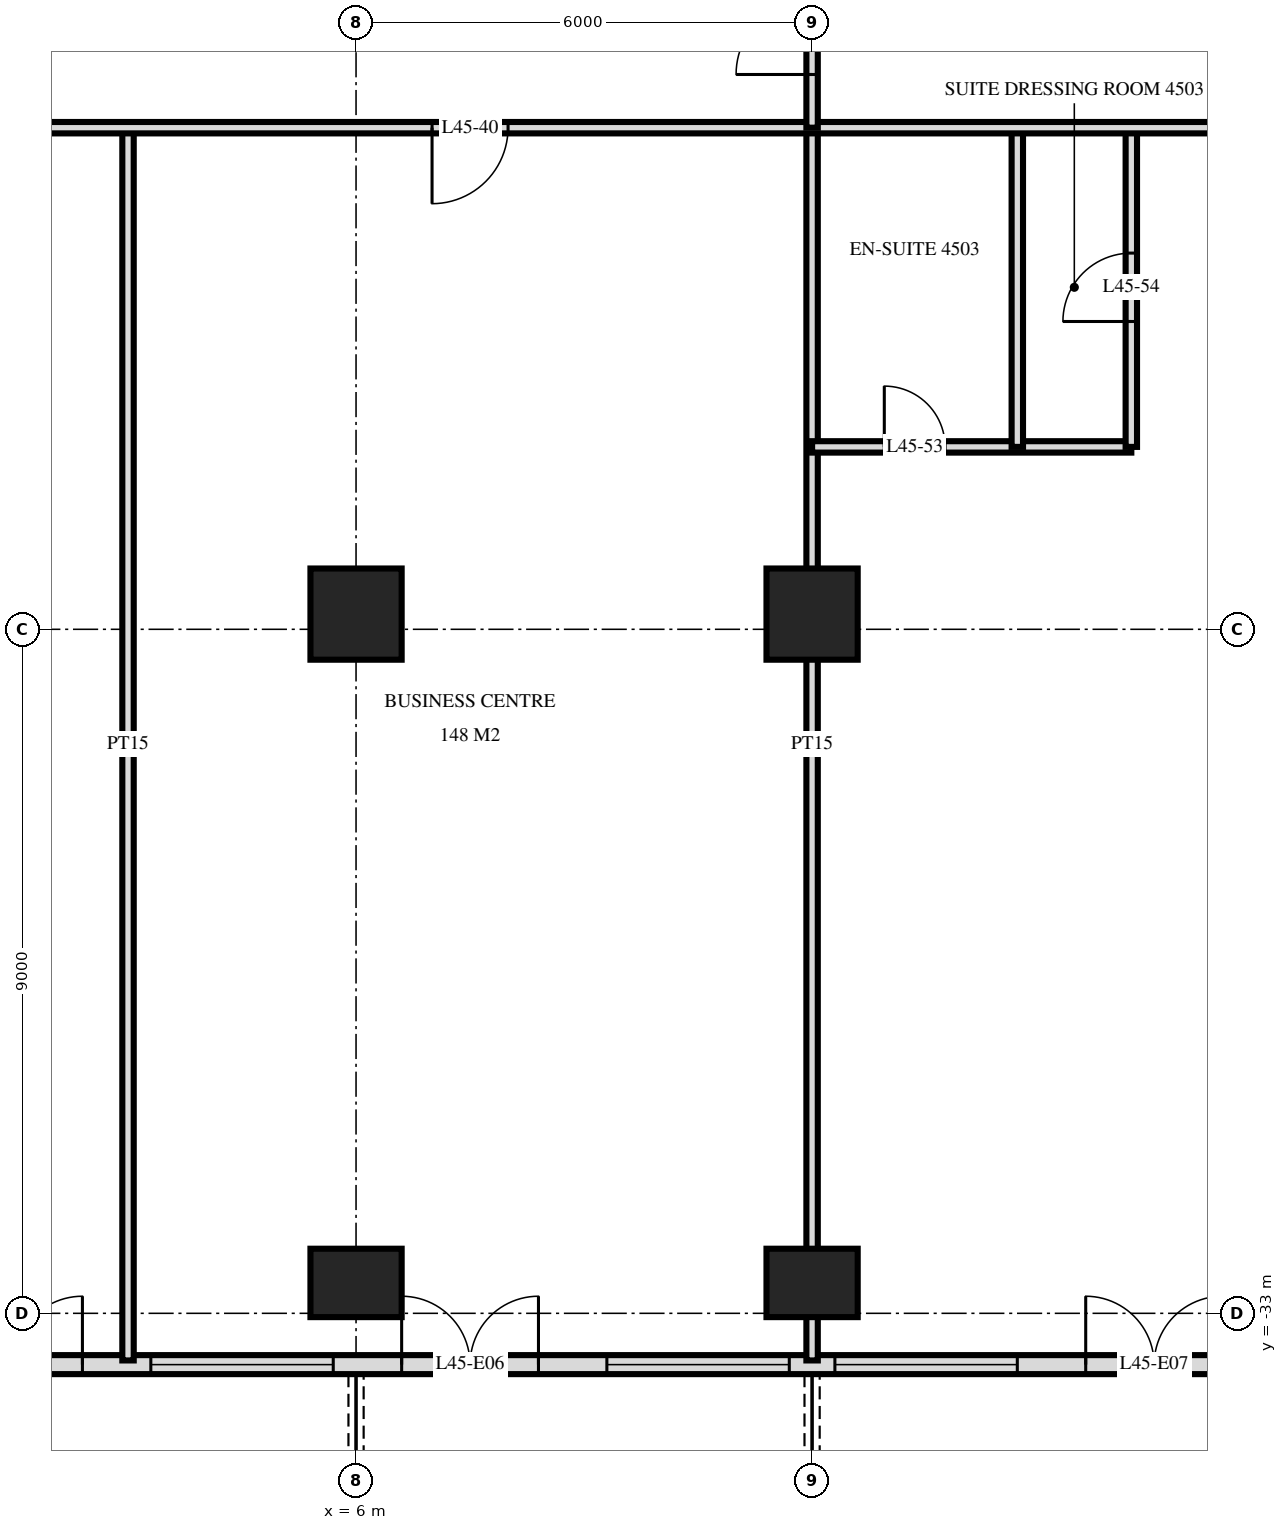
"""IFC4 building model, lengths in metres.
Left out: names, types, materials, properties, quantities, classifications, styles, units other than length and angle.
Written with IfcOpenShell. Run it as: python <this file> out.ifc"""

import sys

from ifc_helpers import new_model, si_unit, direction, frame, frame_2d, origin, origin_2d, place, context, subcontext, project, spatial, rectangle, extrude, element, fill, save


model = new_model("IFC4")
c1 = context("Model", 3, precision=1e-05, world=origin(), true_north=direction((0.0, 1.0)))
c2 = subcontext(c1, "Body", "Model", "MODEL_VIEW")
j1 = project(units=[si_unit("LENGTHUNIT", "METRE"), si_unit("PLANEANGLEUNIT", "RADIAN")], contexts=[c1])
p1 = place(None, origin())
s1 = spatial("IfcSite", under=j1, at=p1, CompositionType="ELEMENT")
p2 = place(p1, origin())
s2 = spatial("IfcBuilding", under=s1, at=p2, CompositionType="ELEMENT")
p3 = place(p2, frame((0.0, 0.0, 174.0)))
s3 = spatial("IfcBuildingStorey", under=s2, at=p3, CompositionType="ELEMENT", Elevation=174.0)
p4 = place(p3, frame((6.0, -32.6, 0.0), z_axis=(0.0, 0.0, 1.0), x_axis=(1.0, 0.0, 0.0)))
e1 = element("IfcColumn", 1, at=p4, inside=s3, PredefinedType="COLUMN", context=c2, shape_type="SweptSolid", body=[
    extrude(rectangle(XDim=1.2, YDim=0.9, at=origin_2d()), origin(), (0.0, 0.0, 1.0), 3.6),
])
p5 = place(p3, frame((6.0, -23.8, 0.0), z_axis=(0.0, 0.0, 1.0), x_axis=(1.0, 0.0, 0.0)))
e2 = element("IfcColumn", 2, at=p5, inside=s3, PredefinedType="COLUMN", context=c2, shape_type="SweptSolid", body=[
    extrude(rectangle(XDim=1.2, YDim=1.2, at=origin_2d()), origin(), (0.0, 0.0, 1.0), 3.6),
])
p6 = place(p3, frame((12.0, -32.6, 0.0), z_axis=(0.0, 0.0, 1.0), x_axis=(1.0, 0.0, 0.0)))
e3 = element("IfcColumn", 3, at=p6, inside=s3, PredefinedType="COLUMN", context=c2, shape_type="SweptSolid", body=[
    extrude(rectangle(XDim=1.2, YDim=0.9, at=origin_2d()), origin(), (0.0, 0.0, 1.0), 3.6),
])
p7 = place(p3, frame((12.0, -23.8, 0.0), z_axis=(0.0, 0.0, 1.0), x_axis=(1.0, 0.0, 0.0)))
e4 = element("IfcColumn", 4, at=p7, inside=s3, PredefinedType="COLUMN", context=c2, shape_type="SweptSolid", body=[
    extrude(rectangle(XDim=1.2, YDim=1.2, at=origin_2d()), origin(), (0.0, 0.0, 1.0), 3.6),
])
p8 = place(p3, frame((-23.675, -33.675, 0.0), z_axis=(0.0, 0.0, 1.0), x_axis=(1.0, 0.0, 0.0)))
e5 = element("IfcWall", 5, at=p8, inside=s3, PredefinedType="SOLIDWALL", context=c2, shape_type="SweptSolid", body=[
    extrude(rectangle(XDim=47.351, YDim=0.25, at=frame_2d((23.675, 0.0))), origin(), (0.0, 0.0, 1.0), 3.3),
])
p9 = place(p8, frame((0.575, 0.0, 0.0)))
e6 = element("IfcOpeningElement", 6, at=p9, cuts=e5, PredefinedType="OPENING", context=c2, shape_type="SweptSolid", body=[
    extrude(rectangle(XDim=1.8, YDim=2.4, at=frame_2d((0.9, 1.2))), frame((0.0, 0.135, 0.0), z_axis=(0.0, -1.0, 0.0), x_axis=(1.0, 0.0, 0.0)), (0.0, 0.0, 1.0), 0.27),
])
p10 = place(p8, frame((3.425, 0.0, 0.3)))
e7 = element("IfcOpeningElement", 7, at=p10, cuts=e5, PredefinedType="OPENING", context=c2, shape_type="SweptSolid", body=[
    extrude(rectangle(XDim=1.8, YDim=2.1, at=frame_2d((0.9, 1.05))), frame((0.0, 0.135, 0.0), z_axis=(0.0, -1.0, 0.0), x_axis=(1.0, 0.0, 0.0)), (0.0, 0.0, 1.0), 0.27),
])
p11 = place(p8, frame((5.975, 0.0, 0.3)))
e8 = element("IfcOpeningElement", 8, at=p11, cuts=e5, PredefinedType="OPENING", context=c2, shape_type="SweptSolid", body=[
    extrude(rectangle(XDim=2.4, YDim=2.1, at=frame_2d((1.2, 1.05))), frame((0.0, 0.135, 0.0), z_axis=(0.0, -1.0, 0.0), x_axis=(1.0, 0.0, 0.0)), (0.0, 0.0, 1.0), 0.27),
])
p12 = place(p8, frame((9.275, 0.0, 0.0)))
e9 = element("IfcOpeningElement", 9, at=p12, cuts=e5, PredefinedType="OPENING", context=c2, shape_type="SweptSolid", body=[
    extrude(rectangle(XDim=1.8, YDim=2.4, at=frame_2d((0.9, 1.2))), frame((0.0, 0.135, 0.0), z_axis=(0.0, -1.0, 0.0), x_axis=(1.0, 0.0, 0.0)), (0.0, 0.0, 1.0), 0.27),
])
p13 = place(p8, frame((12.275, 0.0, 0.0)))
e10 = element("IfcOpeningElement", 10, at=p13, cuts=e5, PredefinedType="OPENING", context=c2, shape_type="SweptSolid", body=[
    extrude(rectangle(XDim=1.8, YDim=2.4, at=frame_2d((0.9, 1.2))), frame((0.0, 0.135, 0.0), z_axis=(0.0, -1.0, 0.0), x_axis=(1.0, 0.0, 0.0)), (0.0, 0.0, 1.0), 0.27),
])
p14 = place(p8, frame((14.975, 0.0, 0.3)))
e11 = element("IfcOpeningElement", 11, at=p14, cuts=e5, PredefinedType="OPENING", context=c2, shape_type="SweptSolid", body=[
    extrude(rectangle(XDim=2.4, YDim=2.1, at=frame_2d((1.2, 1.05))), frame((0.0, 0.135, 0.0), z_axis=(0.0, -1.0, 0.0), x_axis=(1.0, 0.0, 0.0)), (0.0, 0.0, 1.0), 0.27),
])
p15 = place(p8, frame((17.975, 0.0, 0.3)))
e12 = element("IfcOpeningElement", 12, at=p15, cuts=e5, PredefinedType="OPENING", context=c2, shape_type="SweptSolid", body=[
    extrude(rectangle(XDim=2.4, YDim=2.1, at=frame_2d((1.2, 1.05))), frame((0.0, 0.135, 0.0), z_axis=(0.0, -1.0, 0.0), x_axis=(1.0, 0.0, 0.0)), (0.0, 0.0, 1.0), 0.27),
])
p16 = place(p8, frame((21.275, 0.0, 0.0)))
e13 = element("IfcOpeningElement", 13, at=p16, cuts=e5, PredefinedType="OPENING", context=c2, shape_type="SweptSolid", body=[
    extrude(rectangle(XDim=1.8, YDim=2.4, at=frame_2d((0.9, 1.2))), frame((0.0, 0.135, 0.0), z_axis=(0.0, -1.0, 0.0), x_axis=(1.0, 0.0, 0.0)), (0.0, 0.0, 1.0), 0.27),
])
p17 = place(p8, frame((24.275, 0.0, 0.0)))
e14 = element("IfcOpeningElement", 14, at=p17, cuts=e5, PredefinedType="OPENING", context=c2, shape_type="SweptSolid", body=[
    extrude(rectangle(XDim=1.8, YDim=2.4, at=frame_2d((0.9, 1.2))), frame((0.0, 0.135, 0.0), z_axis=(0.0, -1.0, 0.0), x_axis=(1.0, 0.0, 0.0)), (0.0, 0.0, 1.0), 0.27),
])
p18 = place(p8, frame((26.975, 0.0, 0.3)))
e15 = element("IfcOpeningElement", 15, at=p18, cuts=e5, PredefinedType="OPENING", context=c2, shape_type="SweptSolid", body=[
    extrude(rectangle(XDim=2.4, YDim=2.1, at=frame_2d((1.2, 1.05))), frame((0.0, 0.135, 0.0), z_axis=(0.0, -1.0, 0.0), x_axis=(1.0, 0.0, 0.0)), (0.0, 0.0, 1.0), 0.27),
])
p19 = place(p8, frame((30.275, 0.0, 0.0)))
e16 = element("IfcOpeningElement", 16, at=p19, cuts=e5, PredefinedType="OPENING", context=c2, shape_type="SweptSolid", body=[
    extrude(rectangle(XDim=1.8, YDim=2.4, at=frame_2d((0.9, 1.2))), frame((0.0, 0.135, 0.0), z_axis=(0.0, -1.0, 0.0), x_axis=(1.0, 0.0, 0.0)), (0.0, 0.0, 1.0), 0.27),
])
p20 = place(p8, frame((32.975, 0.0, 0.3)))
e17 = element("IfcOpeningElement", 17, at=p20, cuts=e5, PredefinedType="OPENING", context=c2, shape_type="SweptSolid", body=[
    extrude(rectangle(XDim=2.4, YDim=2.1, at=frame_2d((1.2, 1.05))), frame((0.0, 0.135, 0.0), z_axis=(0.0, -1.0, 0.0), x_axis=(1.0, 0.0, 0.0)), (0.0, 0.0, 1.0), 0.27),
])
p21 = place(p8, frame((35.975, 0.0, 0.3)))
e18 = element("IfcOpeningElement", 18, at=p21, cuts=e5, PredefinedType="OPENING", context=c2, shape_type="SweptSolid", body=[
    extrude(rectangle(XDim=2.4, YDim=2.1, at=frame_2d((1.2, 1.05))), frame((0.0, 0.135, 0.0), z_axis=(0.0, -1.0, 0.0), x_axis=(1.0, 0.0, 0.0)), (0.0, 0.0, 1.0), 0.27),
])
p22 = place(p8, frame((39.275, 0.0, 0.0)))
e19 = element("IfcOpeningElement", 19, at=p22, cuts=e5, PredefinedType="OPENING", context=c2, shape_type="SweptSolid", body=[
    extrude(rectangle(XDim=1.8, YDim=2.4, at=frame_2d((0.9, 1.2))), frame((0.0, 0.135, 0.0), z_axis=(0.0, -1.0, 0.0), x_axis=(1.0, 0.0, 0.0)), (0.0, 0.0, 1.0), 0.27),
])
p23 = place(p8, frame((42.275, 0.0, 0.0)))
e20 = element("IfcOpeningElement", 20, at=p23, cuts=e5, PredefinedType="OPENING", context=c2, shape_type="SweptSolid", body=[
    extrude(rectangle(XDim=1.8, YDim=2.4, at=frame_2d((0.9, 1.2))), frame((0.0, 0.135, 0.0), z_axis=(0.0, -1.0, 0.0), x_axis=(1.0, 0.0, 0.0)), (0.0, 0.0, 1.0), 0.27),
])
p24 = place(p8, frame((45.125, 0.0, 0.3)))
e21 = element("IfcOpeningElement", 21, at=p24, cuts=e5, PredefinedType="OPENING", context=c2, shape_type="SweptSolid", body=[
    extrude(rectangle(XDim=1.8, YDim=2.1, at=frame_2d((0.9, 1.05))), frame((0.0, 0.135, 0.0), z_axis=(0.0, -1.0, 0.0), x_axis=(1.0, 0.0, 0.0)), (0.0, 0.0, 1.0), 0.27),
])
p25 = place(p3, frame((16.2, -21.6, 0.0), z_axis=(0.0, 0.0, 1.0), x_axis=(0.0, 1.0, 0.0)))
e22 = element("IfcWall", 22, at=p25, inside=s3, PredefinedType="PARTITIONING", context=c2, shape_type="SweptSolid", body=[
    extrude(rectangle(XDim=4.2, YDim=0.15, at=frame_2d((2.1, 0.0))), origin(), (0.0, 0.0, 1.0), 3.32),
])
p26 = place(p25, frame((1.65, 0.0, 0.0)))
e23 = element("IfcOpeningElement", 23, at=p26, cuts=e22, PredefinedType="OPENING", context=c2, shape_type="SweptSolid", body=[
    extrude(rectangle(XDim=0.9, YDim=2.1, at=frame_2d((0.45, 1.05))), frame((0.0, 0.085, 0.0), z_axis=(0.0, -1.0, 0.0), x_axis=(1.0, 0.0, 0.0)), (0.0, 0.0, 1.0), 0.17),
])
p27 = place(p3, frame((14.7, -21.6, 0.0), z_axis=(0.0, 0.0, 1.0), x_axis=(0.0, 1.0, 0.0)))
e24 = element("IfcWall", 24, at=p27, inside=s3, PredefinedType="PARTITIONING", context=c2, shape_type="SweptSolid", body=[
    extrude(rectangle(XDim=4.2, YDim=0.15, at=frame_2d((2.1, 0.0))), origin(), (0.0, 0.0, 1.0), 3.32),
])
p28 = place(p3, frame((12.0, -17.4, 0.0), z_axis=(0.0, 0.0, 1.0), x_axis=(0.0, 1.0, 0.0)))
e25 = element("IfcWall", 25, at=p28, inside=s3, PredefinedType="PARTITIONING", context=c2, shape_type="SweptSolid", body=[
    extrude(rectangle(XDim=2.35, YDim=0.15, at=frame_2d((1.175, 0.0))), origin(), (0.0, 0.0, 1.0), 3.32),
])
p29 = place(p28, frame((0.7, 0.0, 0.0)))
e26 = element("IfcOpeningElement", 26, at=p29, cuts=e25, PredefinedType="OPENING", context=c2, shape_type="SweptSolid", body=[
    extrude(rectangle(XDim=1.0, YDim=2.1, at=frame_2d((0.5, 1.05))), frame((0.0, 0.085, 0.0), z_axis=(0.0, -1.0, 0.0), x_axis=(1.0, 0.0, 0.0)), (0.0, 0.0, 1.0), 0.17),
])
for number, where, z_axis, x_axis in (
    (27, (12.0, -33.62, 0.0), (0.0, 0.0, 1.0), (0.0, 1.0, 0.0)),
    (28, (3.0, -33.62, 0.0), (0.0, 0.0, 1.0), (0.0, 1.0, 0.0)),
):
    element("IfcWall", number, at=place(p3, frame(where, z_axis=z_axis, x_axis=x_axis)), inside=s3, PredefinedType="PARTITIONING", context=c2, shape_type="SweptSolid", body=[
        extrude(rectangle(XDim=16.22, YDim=0.15, at=frame_2d((8.11, 0.0))), origin(), (0.0, 0.0, 1.0), 3.32),
    ])
p30 = place(p3, frame((12.0, -21.6, 0.0), z_axis=(0.0, 0.0, 1.0), x_axis=(1.0, 0.0, 0.0)))
e29 = element("IfcWall", 29, at=p30, inside=s3, PredefinedType="PARTITIONING", context=c2, shape_type="SweptSolid", body=[
    extrude(rectangle(XDim=4.2, YDim=0.15, at=frame_2d((2.1, 0.0))), origin(), (0.0, 0.0, 1.0), 3.32),
])
p31 = place(p30, frame((0.95, 0.0, 0.0)))
e30 = element("IfcOpeningElement", 30, at=p31, cuts=e29, PredefinedType="OPENING", context=c2, shape_type="SweptSolid", body=[
    extrude(rectangle(XDim=0.8, YDim=2.1, at=frame_2d((0.4, 1.05))), frame((0.0, 0.085, 0.0), z_axis=(0.0, -1.0, 0.0), x_axis=(1.0, 0.0, 0.0)), (0.0, 0.0, 1.0), 0.17),
])
p32 = place(p3, frame((-28.02, -17.4, 0.0), z_axis=(0.0, 0.0, 1.0), x_axis=(1.0, 0.0, 0.0)))
e31 = element("IfcWall", 31, at=p32, inside=s3, PredefinedType="PARTITIONING", context=c2, shape_type="SweptSolid", body=[
    extrude(rectangle(XDim=56.04, YDim=0.15, at=frame_2d((28.02, 0.0))), origin(), (0.0, 0.0, 1.0), 3.32),
])
p33 = place(p32, frame((10.42, 0.0, 0.0)))
e32 = element("IfcOpeningElement", 32, at=p33, cuts=e31, PredefinedType="OPENING", context=c2, shape_type="SweptSolid", body=[
    extrude(rectangle(XDim=1.0, YDim=2.1, at=frame_2d((0.5, 1.05))), frame((0.0, 0.085, 0.0), z_axis=(0.0, -1.0, 0.0), x_axis=(1.0, 0.0, 0.0)), (0.0, 0.0, 1.0), 0.17),
])
p34 = place(p32, frame((2.32, 0.0, 0.0)))
e33 = element("IfcOpeningElement", 33, at=p34, cuts=e31, PredefinedType="OPENING", context=c2, shape_type="SweptSolid", body=[
    extrude(rectangle(XDim=1.0, YDim=2.1, at=frame_2d((0.5, 1.05))), frame((0.0, 0.085, 0.0), z_axis=(0.0, -1.0, 0.0), x_axis=(1.0, 0.0, 0.0)), (0.0, 0.0, 1.0), 0.17),
])
p35 = place(p32, frame((49.72, 0.0, 0.0)))
e34 = element("IfcOpeningElement", 34, at=p35, cuts=e31, PredefinedType="OPENING", context=c2, shape_type="SweptSolid", body=[
    extrude(rectangle(XDim=1.0, YDim=2.1, at=frame_2d((0.5, 1.05))), frame((0.0, 0.085, 0.0), z_axis=(0.0, -1.0, 0.0), x_axis=(1.0, 0.0, 0.0)), (0.0, 0.0, 1.0), 0.17),
])
p36 = place(p32, frame((23.02, 0.0, 0.0)))
e35 = element("IfcOpeningElement", 35, at=p36, cuts=e31, PredefinedType="OPENING", context=c2, shape_type="SweptSolid", body=[
    extrude(rectangle(XDim=1.0, YDim=2.1, at=frame_2d((0.5, 1.05))), frame((0.0, 0.085, 0.0), z_axis=(0.0, -1.0, 0.0), x_axis=(1.0, 0.0, 0.0)), (0.0, 0.0, 1.0), 0.17),
])
p37 = place(p32, frame((35.02, 0.0, 0.0)))
e36 = element("IfcOpeningElement", 36, at=p37, cuts=e31, PredefinedType="OPENING", context=c2, shape_type="SweptSolid", body=[
    extrude(rectangle(XDim=1.0, YDim=2.1, at=frame_2d((0.5, 1.05))), frame((0.0, 0.085, 0.0), z_axis=(0.0, -1.0, 0.0), x_axis=(1.0, 0.0, 0.0)), (0.0, 0.0, 1.0), 0.17),
])
p38 = place(p17, origin())
e37 = element("IfcDoor", 37, at=p38, inside=s3, OperationType="DOUBLE_DOOR_SINGLE_SWING", PredefinedType="DOOR", context=c2, shape_type="SweptSolid", body=[
    extrude(rectangle(XDim=1.8, YDim=2.4, at=frame_2d((0.9, 1.2))), frame((0.0, 0.025, 0.0), z_axis=(0.0, -1.0, 0.0), x_axis=(1.0, 0.0, 0.0)), (0.0, 0.0, 1.0), 0.05),
])
fill(e14, e37)
p39 = place(p18, origin())
e38 = element("IfcWindow", 38, at=p39, inside=s3, PartitioningType="SINGLE_PANEL", PredefinedType="WINDOW", context=c2, shape_type="SweptSolid", body=[
    extrude(rectangle(XDim=2.4, YDim=2.1, at=frame_2d((1.2, 1.05))), frame((0.0, 0.03, 0.0), z_axis=(0.0, -1.0, 0.0), x_axis=(1.0, 0.0, 0.0)), (0.0, 0.0, 1.0), 0.06),
])
fill(e15, e38)
p40 = place(p19, origin())
e39 = element("IfcDoor", 39, at=p40, inside=s3, OperationType="DOUBLE_DOOR_SINGLE_SWING", PredefinedType="DOOR", context=c2, shape_type="SweptSolid", body=[
    extrude(rectangle(XDim=1.8, YDim=2.4, at=frame_2d((0.9, 1.2))), frame((0.0, 0.025, 0.0), z_axis=(0.0, -1.0, 0.0), x_axis=(1.0, 0.0, 0.0)), (0.0, 0.0, 1.0), 0.05),
])
fill(e16, e39)
p41 = place(p20, origin())
e40 = element("IfcWindow", 40, at=p41, inside=s3, PartitioningType="SINGLE_PANEL", PredefinedType="WINDOW", context=c2, shape_type="SweptSolid", body=[
    extrude(rectangle(XDim=2.4, YDim=2.1, at=frame_2d((1.2, 1.05))), frame((0.0, 0.03, 0.0), z_axis=(0.0, -1.0, 0.0), x_axis=(1.0, 0.0, 0.0)), (0.0, 0.0, 1.0), 0.06),
])
fill(e17, e40)
p42 = place(p21, origin())
e41 = element("IfcWindow", 41, at=p42, inside=s3, PartitioningType="SINGLE_PANEL", PredefinedType="WINDOW", context=c2, shape_type="SweptSolid", body=[
    extrude(rectangle(XDim=2.4, YDim=2.1, at=frame_2d((1.2, 1.05))), frame((0.0, 0.03, 0.0), z_axis=(0.0, -1.0, 0.0), x_axis=(1.0, 0.0, 0.0)), (0.0, 0.0, 1.0), 0.06),
])
fill(e18, e41)
p43 = place(p22, origin())
e42 = element("IfcDoor", 42, at=p43, inside=s3, OperationType="DOUBLE_DOOR_SINGLE_SWING", PredefinedType="DOOR", context=c2, shape_type="SweptSolid", body=[
    extrude(rectangle(XDim=1.8, YDim=2.4, at=frame_2d((0.9, 1.2))), frame((0.0, 0.025, 0.0), z_axis=(0.0, -1.0, 0.0), x_axis=(1.0, 0.0, 0.0)), (0.0, 0.0, 1.0), 0.05),
])
fill(e19, e42)
p44 = place(p29, origin())
e43 = element("IfcDoor", 43, at=p44, inside=s3, OperationType="SINGLE_SWING_RIGHT", PredefinedType="DOOR", context=c2, shape_type="SweptSolid", body=[
    extrude(rectangle(XDim=1.0, YDim=2.1, at=frame_2d((0.5, 1.05))), frame((0.0, 0.025, 0.0), z_axis=(0.0, -1.0, 0.0), x_axis=(1.0, 0.0, 0.0)), (0.0, 0.0, 1.0), 0.05),
])
fill(e26, e43)
p45 = place(p37, frame((0.5, 0.0, 0.0), z_axis=(0.0, 0.0, 1.0), x_axis=(-1.0, 0.0, 0.0)))
e44 = element("IfcDoor", 44, at=p45, inside=s3, OperationType="SINGLE_SWING_LEFT", PredefinedType="DOOR", context=c2, shape_type="SweptSolid", body=[
    extrude(rectangle(XDim=1.0, YDim=2.1, at=frame_2d((0.0, 1.05))), frame((0.0, -0.025, 0.0), z_axis=(0.0, 1.0, 0.0), x_axis=(-1.0, 0.0, 0.0)), (0.0, 0.0, 1.0), 0.05),
])
fill(e36, e44)
p46 = place(p31, origin())
e45 = element("IfcDoor", 45, at=p46, inside=s3, OperationType="SINGLE_SWING_RIGHT", PredefinedType="DOOR", context=c2, shape_type="SweptSolid", body=[
    extrude(rectangle(XDim=0.8, YDim=2.1, at=frame_2d((0.4, 1.05))), frame((0.0, 0.025, 0.0), z_axis=(0.0, -1.0, 0.0), x_axis=(1.0, 0.0, 0.0)), (0.0, 0.0, 1.0), 0.05),
])
fill(e30, e45)
p47 = place(p26, origin())
e46 = element("IfcDoor", 46, at=p47, inside=s3, OperationType="SINGLE_SWING_RIGHT", PredefinedType="DOOR", context=c2, shape_type="SweptSolid", body=[
    extrude(rectangle(XDim=0.9, YDim=2.1, at=frame_2d((0.45, 1.05))), frame((0.0, 0.025, 0.0), z_axis=(0.0, -1.0, 0.0), x_axis=(1.0, 0.0, 0.0)), (0.0, 0.0, 1.0), 0.05),
])
fill(e23, e46)
save(model, sys.argv[1])
